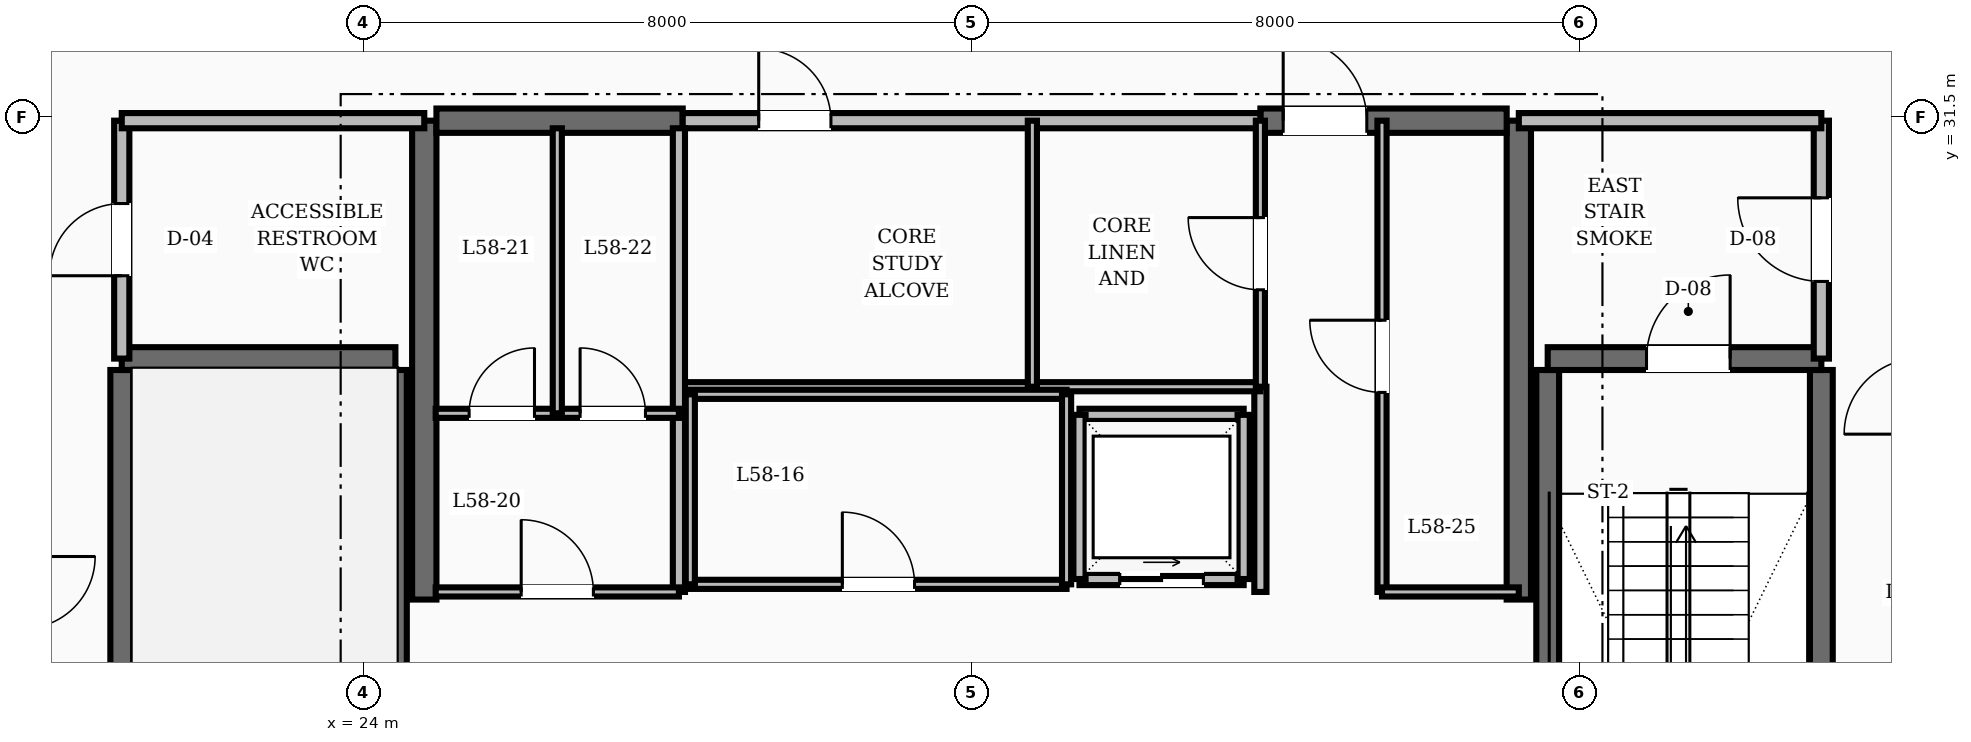
"""IFC4 building model, lengths in metres.
Left out: names, types, materials, properties, quantities, classifications, styles, units other than length and angle.
Written with IfcOpenShell. Run it as: python <this file> out.ifc"""

import sys

from ifc_helpers import new_model, si_unit, direction, frame, frame_2d, origin, place, context, subcontext, project, spatial, rectangle, extrude, element, fill, save


model = new_model("IFC4")
c1 = context("Model", 3, precision=1e-05, world=origin(), true_north=direction((0.0, 1.0)))
c2 = subcontext(c1, "Body", "Model", "MODEL_VIEW")
j1 = project(units=[si_unit("LENGTHUNIT", "METRE"), si_unit("PLANEANGLEUNIT", "RADIAN")], contexts=[c1])
p1 = place(None, origin())
s1 = spatial("IfcSite", under=j1, at=p1, CompositionType="ELEMENT")
p2 = place(p1, origin())
s2 = spatial("IfcBuilding", under=s1, at=p2, CompositionType="ELEMENT")
p3 = place(p2, frame((0.0, 0.0, 225.6)))
s3 = spatial("IfcBuildingStorey", under=s2, at=p3, CompositionType="ELEMENT", Elevation=225.6)
for number, where, z_axis, x_axis in (
    (1, (24.8, 25.15, 0.0), (0.0, 0.0, 1.0), (0.0, 1.0, 0.0)),
    (2, (39.2, 25.15, 0.0), (0.0, 0.0, 1.0), (0.0, 1.0, 0.0)),
):
    element("IfcWall", number, at=place(p3, frame(where, z_axis=z_axis, x_axis=x_axis)), inside=s3, PredefinedType="SHEAR", context=c2, shape_type="SweptSolid", body=[
        extrude(rectangle(XDim=6.3, YDim=0.32, at=frame_2d((3.15, 0.0))), origin(), (0.0, 0.0, 1.0), 3.6),
    ])
p4 = place(p3, frame((24.96, 31.45, 0.0), z_axis=(0.0, 0.0, 1.0), x_axis=(1.0, 0.0, 0.0)))
e3 = element("IfcWall", 3, at=p4, inside=s3, PredefinedType="SHEAR", context=c2, shape_type="SweptSolid", body=[
    extrude(rectangle(XDim=3.24, YDim=0.32, at=frame_2d((1.62, 0.0))), origin(), (0.0, 0.0, 1.0), 3.6),
])
p5 = place(p3, frame((35.8, 31.45, 0.0), z_axis=(0.0, 0.0, 1.0), x_axis=(1.0, 0.0, 0.0)))
e4 = element("IfcWall", 4, at=p5, inside=s3, PredefinedType="SHEAR", context=c2, shape_type="SweptSolid", body=[
    extrude(rectangle(XDim=3.24, YDim=0.32, at=frame_2d((1.62, 0.0))), origin(), (0.0, 0.0, 1.0), 3.6),
])
p6 = place(p5, frame((0.3, 0.0, 0.0)))
e5 = element("IfcOpeningElement", 5, at=p6, cuts=e4, PredefinedType="OPENING", context=c2, shape_type="SweptSolid", body=[
    extrude(rectangle(XDim=1.1, YDim=2.1, at=frame_2d((0.55, 1.05))), frame((0.0, 0.17, 0.0), z_axis=(0.0, -1.0, 0.0), x_axis=(1.0, 0.0, 0.0)), (0.0, 0.0, 1.0), 0.34),
])
for number, where, z_axis, x_axis in (
    (6, (20.82, 19.43, 0.0), (0.0, 0.0, 1.0), (0.0, 1.0, 0.0)),
    (7, (24.42, 19.43, 0.0), (0.0, 0.0, 1.0), (0.0, 1.0, 0.0)),
):
    element("IfcWall", number, at=place(p3, frame(where, z_axis=z_axis, x_axis=x_axis)), inside=s3, PredefinedType="SHEAR", context=c2, shape_type="SweptSolid", body=[
        extrude(rectangle(XDim=8.74, YDim=0.3, at=frame_2d((4.37, 0.0))), origin(), (0.0, 0.0, 1.0), 3.6),
    ])
p7 = place(p3, frame((20.82, 28.32, 0.0), z_axis=(0.0, 0.0, 1.0), x_axis=(1.0, 0.0, 0.0)))
e8 = element("IfcWall", 8, at=p7, inside=s3, PredefinedType="SHEAR", context=c2, shape_type="SweptSolid", body=[
    extrude(rectangle(XDim=3.6, YDim=0.3, at=frame_2d((1.8, 0.0))), origin(), (0.0, 0.0, 1.0), 3.6),
])
for number, where, z_axis, x_axis in (
    (9, (43.18, 19.43, 0.0), (0.0, 0.0, 1.0), (0.0, 1.0, 0.0)),
    (10, (39.58, 19.43, 0.0), (0.0, 0.0, 1.0), (0.0, 1.0, 0.0)),
):
    element("IfcWall", number, at=place(p3, frame(where, z_axis=z_axis, x_axis=x_axis)), inside=s3, PredefinedType="SHEAR", context=c2, shape_type="SweptSolid", body=[
        extrude(rectangle(XDim=8.74, YDim=0.3, at=frame_2d((4.37, 0.0))), origin(), (0.0, 0.0, 1.0), 3.6),
    ])
p8 = place(p3, frame((39.58, 28.32, 0.0), z_axis=(0.0, 0.0, 1.0), x_axis=(1.0, 0.0, 0.0)))
e11 = element("IfcWall", 11, at=p8, inside=s3, PredefinedType="SHEAR", context=c2, shape_type="SweptSolid", body=[
    extrude(rectangle(XDim=3.6, YDim=0.3, at=frame_2d((1.8, 0.0))), origin(), (0.0, 0.0, 1.0), 3.6),
])
p9 = place(p8, frame((1.3, 0.0, 0.0)))
e12 = element("IfcOpeningElement", 12, at=p9, cuts=e11, PredefinedType="OPENING", context=c2, shape_type="SweptSolid", body=[
    extrude(rectangle(XDim=1.1, YDim=2.1, at=frame_2d((0.55, 1.05))), frame((0.0, 0.16, 0.0), z_axis=(0.0, -1.0, 0.0), x_axis=(1.0, 0.0, 0.0)), (0.0, 0.0, 1.0), 0.32),
])
p10 = place(p3, frame((43.18, 28.32, 0.0), z_axis=(0.0, 0.0, 1.0), x_axis=(0.0, 1.0, 0.0)))
e13 = element("IfcWall", 13, at=p10, inside=s3, PredefinedType="SOLIDWALL", context=c2, shape_type="SweptSolid", body=[
    extrude(rectangle(XDim=3.13, YDim=0.2, at=frame_2d((1.565, 0.0))), origin(), (0.0, 0.0, 1.0), 2.87),
])
p11 = place(p10, frame((1.015, 0.0, 0.0)))
e14 = element("IfcOpeningElement", 14, at=p11, cuts=e13, PredefinedType="OPENING", context=c2, shape_type="SweptSolid", body=[
    extrude(rectangle(XDim=1.1, YDim=2.1, at=frame_2d((0.55, 1.05))), frame((0.0, 0.11, 0.0), z_axis=(0.0, -1.0, 0.0), x_axis=(1.0, 0.0, 0.0)), (0.0, 0.0, 1.0), 0.22),
])
p12 = place(p3, frame((39.2, 31.45, 0.0), z_axis=(0.0, 0.0, 1.0), x_axis=(1.0, 0.0, 0.0)))
e15 = element("IfcWall", 15, at=p12, inside=s3, PredefinedType="SOLIDWALL", context=c2, shape_type="SweptSolid", body=[
    extrude(rectangle(XDim=3.98, YDim=0.2, at=frame_2d((1.99, 0.0))), origin(), (0.0, 0.0, 1.0), 2.87),
])
p13 = place(p3, frame((20.82, 28.32, 0.0), z_axis=(0.0, 0.0, 1.0), x_axis=(0.0, 1.0, 0.0)))
e16 = element("IfcWall", 16, at=p13, inside=s3, PredefinedType="SOLIDWALL", context=c2, shape_type="SweptSolid", body=[
    extrude(rectangle(XDim=3.13, YDim=0.2, at=frame_2d((1.565, 0.0))), origin(), (0.0, 0.0, 1.0), 2.87),
])
p14 = place(p13, frame((1.09, 0.0, 0.0)))
e17 = element("IfcOpeningElement", 17, at=p14, cuts=e16, PredefinedType="OPENING", context=c2, shape_type="SweptSolid", body=[
    extrude(rectangle(XDim=0.95, YDim=2.1, at=frame_2d((0.475, 1.05))), frame((0.0, 0.11, 0.0), z_axis=(0.0, -1.0, 0.0), x_axis=(1.0, 0.0, 0.0)), (0.0, 0.0, 1.0), 0.22),
])
p15 = place(p3, frame((20.82, 31.45, 0.0), z_axis=(0.0, 0.0, 1.0), x_axis=(1.0, 0.0, 0.0)))
e18 = element("IfcWall", 18, at=p15, inside=s3, PredefinedType="SOLIDWALL", context=c2, shape_type="SweptSolid", body=[
    extrude(rectangle(XDim=3.98, YDim=0.2, at=frame_2d((1.99, 0.0))), origin(), (0.0, 0.0, 1.0), 2.87),
])
p16 = place(p3, frame((35.8, 25.25, 0.0), z_axis=(0.0, 0.0, 1.0), x_axis=(0.0, 1.0, 0.0)))
e19 = element("IfcWall", 19, at=p16, inside=s3, PredefinedType="SOLIDWALL", context=c2, shape_type="SweptSolid", body=[
    extrude(rectangle(XDim=2.7, YDim=0.16, at=frame_2d((1.35, 0.0))), origin(), (0.0, 0.0, 1.0), 2.87),
])
p17 = place(p3, frame((33.42, 25.42, 0.0), z_axis=(0.0, 0.0, 1.0), x_axis=(1.0, 0.0, 0.0)))
e20 = element("IfcWall", 20, at=p17, inside=s3, PredefinedType="SOLIDWALL", context=c2, shape_type="SweptSolid", body=[
    extrude(rectangle(XDim=2.16, YDim=0.16, at=frame_2d((1.08, 0.0))), origin(), (0.0, 0.0, 1.0), 2.87),
])
p18 = place(p17, frame((0.53, 0.0, 0.0)))
e21 = element("IfcOpeningElement", 21, at=p18, cuts=e20, PredefinedType="OPENING", context=c2, shape_type="SweptSolid", body=[
    extrude(rectangle(XDim=1.1, YDim=2.15, at=frame_2d((0.55, 1.075))), frame((0.0, 0.09, 0.0), z_axis=(0.0, -1.0, 0.0), x_axis=(1.0, 0.0, 0.0)), (0.0, 0.0, 1.0), 0.18),
])
for number, where, z_axis, x_axis in (
    (22, (33.42, 27.58, 0.0), (0.0, 0.0, 1.0), (1.0, 0.0, 0.0)),
    (23, (33.42, 25.42, 0.0), (0.0, 0.0, 1.0), (0.0, 1.0, 0.0)),
    (24, (35.58, 25.42, 0.0), (0.0, 0.0, 1.0), (0.0, 1.0, 0.0)),
):
    element("IfcWall", number, at=place(p3, frame(where, z_axis=z_axis, x_axis=x_axis)), inside=s3, PredefinedType="SOLIDWALL", context=c2, shape_type="SweptSolid", body=[
        extrude(rectangle(XDim=2.16, YDim=0.16, at=frame_2d((1.08, 0.0))), origin(), (0.0, 0.0, 1.0), 2.87),
    ])
p19 = place(p3, frame((28.2, 31.45, 0.0), z_axis=(0.0, 0.0, 1.0), x_axis=(1.0, 0.0, 0.0)))
e25 = element("IfcWall", 25, at=p19, inside=s3, PredefinedType="SOLIDWALL", context=c2, shape_type="SweptSolid", body=[
    extrude(rectangle(XDim=7.6, YDim=0.2, at=frame_2d((3.8, 0.0))), origin(), (0.0, 0.0, 1.0), 2.87),
])
p20 = place(p19, frame((1.0, 0.0, 0.0)))
e26 = element("IfcOpeningElement", 26, at=p20, cuts=e25, PredefinedType="OPENING", context=c2, shape_type="SweptSolid", body=[
    extrude(rectangle(XDim=0.95, YDim=2.1, at=frame_2d((0.475, 1.05))), frame((0.0, 0.11, 0.0), z_axis=(0.0, -1.0, 0.0), x_axis=(1.0, 0.0, 0.0)), (0.0, 0.0, 1.0), 0.22),
])
p21 = place(p3, frame((28.2, 27.95, 0.0), z_axis=(0.0, 0.0, 1.0), x_axis=(1.0, 0.0, 0.0)))
e27 = element("IfcWall", 27, at=p21, inside=s3, PredefinedType="PARTITIONING", context=c2, shape_type="SweptSolid", body=[
    extrude(rectangle(XDim=7.6, YDim=0.12, at=frame_2d((3.8, 0.0))), origin(), (0.0, 0.0, 1.0), 2.87),
])
p22 = place(p3, frame((35.8, 27.95, 0.0), z_axis=(0.0, 0.0, 1.0), x_axis=(0.0, 1.0, 0.0)))
e28 = element("IfcWall", 28, at=p22, inside=s3, PredefinedType="PARTITIONING", context=c2, shape_type="SweptSolid", body=[
    extrude(rectangle(XDim=3.5, YDim=0.12, at=frame_2d((1.75, 0.0))), origin(), (0.0, 0.0, 1.0), 2.87),
])
p23 = place(p22, frame((1.275, 0.0, 0.0)))
e29 = element("IfcOpeningElement", 29, at=p23, cuts=e28, PredefinedType="OPENING", context=c2, shape_type="SweptSolid", body=[
    extrude(rectangle(XDim=0.95, YDim=2.1, at=frame_2d((0.475, 1.05))), frame((0.0, 0.07, 0.0), z_axis=(0.0, -1.0, 0.0), x_axis=(1.0, 0.0, 0.0)), (0.0, 0.0, 1.0), 0.14),
])
p24 = place(p3, frame((32.8, 27.95, 0.0), z_axis=(0.0, 0.0, 1.0), x_axis=(0.0, 1.0, 0.0)))
e30 = element("IfcWall", 30, at=p24, inside=s3, PredefinedType="PARTITIONING", context=c2, shape_type="SweptSolid", body=[
    extrude(rectangle(XDim=3.5, YDim=0.12, at=frame_2d((1.75, 0.0))), origin(), (0.0, 0.0, 1.0), 2.87),
])
p25 = place(p3, frame((28.3, 25.35, 0.0), z_axis=(0.0, 0.0, 1.0), x_axis=(1.0, 0.0, 0.0)))
e31 = element("IfcWall", 31, at=p25, inside=s3, PredefinedType="PARTITIONING", context=c2, shape_type="SweptSolid", body=[
    extrude(rectangle(XDim=4.95, YDim=0.12, at=frame_2d((2.475, 0.0))), origin(), (0.0, 0.0, 1.0), 2.87),
])
p26 = place(p25, frame((2.0, 0.0, 0.0)))
e32 = element("IfcOpeningElement", 32, at=p26, cuts=e31, PredefinedType="OPENING", context=c2, shape_type="SweptSolid", body=[
    extrude(rectangle(XDim=0.95, YDim=2.1, at=frame_2d((0.475, 1.05))), frame((0.0, 0.07, 0.0), z_axis=(0.0, -1.0, 0.0), x_axis=(1.0, 0.0, 0.0)), (0.0, 0.0, 1.0), 0.14),
])
p27 = place(p3, frame((28.3, 27.85, 0.0), z_axis=(0.0, 0.0, 1.0), x_axis=(1.0, 0.0, 0.0)))
e33 = element("IfcWall", 33, at=p27, inside=s3, PredefinedType="PARTITIONING", context=c2, shape_type="SweptSolid", body=[
    extrude(rectangle(XDim=4.95, YDim=0.12, at=frame_2d((2.475, 0.0))), origin(), (0.0, 0.0, 1.0), 2.87),
])
for number, where, z_axis, x_axis in (
    (34, (28.3, 25.35, 0.0), (0.0, 0.0, 1.0), (0.0, 1.0, 0.0)),
    (35, (33.25, 25.35, 0.0), (0.0, 0.0, 1.0), (0.0, 1.0, 0.0)),
):
    element("IfcWall", number, at=place(p3, frame(where, z_axis=z_axis, x_axis=x_axis)), inside=s3, PredefinedType="PARTITIONING", context=c2, shape_type="SweptSolid", body=[
        extrude(rectangle(XDim=2.5, YDim=0.12, at=frame_2d((1.25, 0.0))), origin(), (0.0, 0.0, 1.0), 2.87),
    ])
p28 = place(p3, frame((28.15, 25.25, 0.0), z_axis=(0.0, 0.0, 1.0), x_axis=(0.0, 1.0, 0.0)))
e36 = element("IfcWall", 36, at=p28, inside=s3, PredefinedType="SOLIDWALL", context=c2, shape_type="SweptSolid", body=[
    extrude(rectangle(XDim=6.1, YDim=0.16, at=frame_2d((3.05, 0.0))), origin(), (0.0, 0.0, 1.0), 2.87),
])
p29 = place(p3, frame((24.95, 25.25, 0.0), z_axis=(0.0, 0.0, 1.0), x_axis=(1.0, 0.0, 0.0)))
e37 = element("IfcWall", 37, at=p29, inside=s3, PredefinedType="PARTITIONING", context=c2, shape_type="SweptSolid", body=[
    extrude(rectangle(XDim=3.2, YDim=0.12, at=frame_2d((1.6, 0.0))), origin(), (0.0, 0.0, 1.0), 2.87),
])
p30 = place(p29, frame((1.125, 0.0, 0.0)))
e38 = element("IfcOpeningElement", 38, at=p30, cuts=e37, PredefinedType="OPENING", context=c2, shape_type="SweptSolid", body=[
    extrude(rectangle(XDim=0.95, YDim=2.1, at=frame_2d((0.475, 1.05))), frame((0.0, 0.07, 0.0), z_axis=(0.0, -1.0, 0.0), x_axis=(1.0, 0.0, 0.0)), (0.0, 0.0, 1.0), 0.14),
])
p31 = place(p3, frame((37.4, 25.25, 0.0), z_axis=(0.0, 0.0, 1.0), x_axis=(0.0, 1.0, 0.0)))
e39 = element("IfcWall", 39, at=p31, inside=s3, PredefinedType="PARTITIONING", context=c2, shape_type="SweptSolid", body=[
    extrude(rectangle(XDim=6.2, YDim=0.12, at=frame_2d((3.1, 0.0))), origin(), (0.0, 0.0, 1.0), 2.87),
])
p32 = place(p31, frame((2.625, 0.0, 0.0)))
e40 = element("IfcOpeningElement", 40, at=p32, cuts=e39, PredefinedType="OPENING", context=c2, shape_type="SweptSolid", body=[
    extrude(rectangle(XDim=0.95, YDim=2.1, at=frame_2d((0.475, 1.05))), frame((0.0, 0.07, 0.0), z_axis=(0.0, -1.0, 0.0), x_axis=(1.0, 0.0, 0.0)), (0.0, 0.0, 1.0), 0.14),
])
p33 = place(p3, frame((37.4, 25.25, 0.0), z_axis=(0.0, 0.0, 1.0), x_axis=(1.0, 0.0, 0.0)))
e41 = element("IfcWall", 41, at=p33, inside=s3, PredefinedType="PARTITIONING", context=c2, shape_type="SweptSolid", body=[
    extrude(rectangle(XDim=1.8, YDim=0.12, at=frame_2d((0.9, 0.0))), origin(), (0.0, 0.0, 1.0), 2.87),
])
p34 = place(p3, frame((24.95, 27.6, 0.0), z_axis=(0.0, 0.0, 1.0), x_axis=(1.0, 0.0, 0.0)))
e42 = element("IfcWall", 42, at=p34, inside=s3, PredefinedType="PARTITIONING", context=c2, shape_type="SweptSolid", body=[
    extrude(rectangle(XDim=3.2, YDim=0.12, at=frame_2d((1.6, 0.0))), origin(), (0.0, 0.0, 1.0), 2.87),
])
p35 = place(p34, frame((0.44, 0.0, 0.0)))
e43 = element("IfcOpeningElement", 43, at=p35, cuts=e42, PredefinedType="OPENING", context=c2, shape_type="SweptSolid", body=[
    extrude(rectangle(XDim=0.86, YDim=2.1, at=frame_2d((0.43, 1.05))), frame((0.0, 0.07, 0.0), z_axis=(0.0, -1.0, 0.0), x_axis=(1.0, 0.0, 0.0)), (0.0, 0.0, 1.0), 0.14),
])
p36 = place(p34, frame((1.9, 0.0, 0.0)))
e44 = element("IfcOpeningElement", 44, at=p36, cuts=e42, PredefinedType="OPENING", context=c2, shape_type="SweptSolid", body=[
    extrude(rectangle(XDim=0.86, YDim=2.1, at=frame_2d((0.43, 1.05))), frame((0.0, 0.07, 0.0), z_axis=(0.0, -1.0, 0.0), x_axis=(1.0, 0.0, 0.0)), (0.0, 0.0, 1.0), 0.14),
])
p37 = place(p3, frame((26.55, 27.6, 0.0), z_axis=(0.0, 0.0, 1.0), x_axis=(0.0, 1.0, 0.0)))
e45 = element("IfcWall", 45, at=p37, inside=s3, PredefinedType="PARTITIONING", context=c2, shape_type="SweptSolid", body=[
    extrude(rectangle(XDim=3.75, YDim=0.12, at=frame_2d((1.875, 0.0))), origin(), (0.0, 0.0, 1.0), 2.87),
])
p38 = place(p3, frame((44.427, 32.303, 0.0), z_axis=(0.0, 0.0, 1.0), x_axis=(-0.707106781187, 0.707106781187, 0.0)))
e46 = element("IfcWall", 46, at=p38, inside=s3, PredefinedType="SOLIDWALL", context=c2, shape_type="SweptSolid", body=[
    extrude(rectangle(XDim=2.916, YDim=0.16, at=frame_2d((1.458, 0.0))), origin(), (0.0, 0.0, 1.0), 2.87),
])
p39 = place(p3, frame((21.635, 34.365, 0.0), z_axis=(0.0, 0.0, 1.0), x_axis=(-0.707106781187, -0.707106781187, 0.0)))
e47 = element("IfcWall", 47, at=p39, inside=s3, PredefinedType="SOLIDWALL", context=c2, shape_type="SweptSolid", body=[
    extrude(rectangle(XDim=2.916, YDim=0.16, at=frame_2d((1.458, 0.0))), origin(), (0.0, 0.0, 1.0), 2.87),
])
p40 = place(p39, frame((0.983, 0.0, 0.0)))
e48 = element("IfcOpeningElement", 48, at=p40, cuts=e47, PredefinedType="OPENING", context=c2, shape_type="SweptSolid", body=[
    extrude(rectangle(XDim=0.95, YDim=2.1, at=frame_2d((0.475, 1.05))), frame((0.0, 0.09, 0.0), z_axis=(0.0, -1.0, 0.0), x_axis=(1.0, 0.0, 0.0)), (0.0, 0.0, 1.0), 0.18),
])
p41 = place(p9, origin())
e49 = element("IfcDoor", 49, at=p41, inside=s3, OperationType="SINGLE_SWING_RIGHT", PredefinedType="DOOR", context=c2, shape_type="SweptSolid", body=[
    extrude(rectangle(XDim=1.1, YDim=2.1, at=frame_2d((0.55, 1.05))), frame((0.0, 0.025, 0.0), z_axis=(0.0, -1.0, 0.0), x_axis=(1.0, 0.0, 0.0)), (0.0, 0.0, 1.0), 0.05),
])
fill(e12, e49)
p42 = place(p11, origin())
e50 = element("IfcDoor", 50, at=p42, inside=s3, OperationType="SINGLE_SWING_RIGHT", PredefinedType="DOOR", context=c2, shape_type="SweptSolid", body=[
    extrude(rectangle(XDim=1.1, YDim=2.1, at=frame_2d((0.55, 1.05))), frame((0.0, 0.025, 0.0), z_axis=(0.0, -1.0, 0.0), x_axis=(1.0, 0.0, 0.0)), (0.0, 0.0, 1.0), 0.05),
])
fill(e14, e50)
p43 = place(p14, origin())
e51 = element("IfcDoor", 51, at=p43, inside=s3, OperationType="SINGLE_SWING_LEFT", PredefinedType="DOOR", context=c2, shape_type="SweptSolid", body=[
    extrude(rectangle(XDim=0.95, YDim=2.1, at=frame_2d((0.475, 1.05))), frame((0.0, 0.025, 0.0), z_axis=(0.0, -1.0, 0.0), x_axis=(1.0, 0.0, 0.0)), (0.0, 0.0, 1.0), 0.05),
])
fill(e17, e51)
p44 = place(p6, origin())
e52 = element("IfcDoor", 52, at=p44, inside=s3, OperationType="SINGLE_SWING_LEFT", PredefinedType="DOOR", context=c2, shape_type="SweptSolid", body=[
    extrude(rectangle(XDim=1.1, YDim=2.1, at=frame_2d((0.55, 1.05))), frame((0.0, 0.025, 0.0), z_axis=(0.0, -1.0, 0.0), x_axis=(1.0, 0.0, 0.0)), (0.0, 0.0, 1.0), 0.05),
])
fill(e5, e52)
p45 = place(p18, origin())
e53 = element("IfcDoor", 53, at=p45, inside=s3, OperationType="SLIDING_TO_RIGHT", PredefinedType="DOOR", context=c2, shape_type="SweptSolid", body=[
    extrude(rectangle(XDim=1.1, YDim=2.15, at=frame_2d((0.55, 1.075))), frame((0.0, 0.025, 0.0), z_axis=(0.0, -1.0, 0.0), x_axis=(1.0, 0.0, 0.0)), (0.0, 0.0, 1.0), 0.05),
])
fill(e21, e53)
p46 = place(p20, origin())
e54 = element("IfcDoor", 54, at=p46, inside=s3, OperationType="SINGLE_SWING_LEFT", PredefinedType="DOOR", context=c2, shape_type="SweptSolid", body=[
    extrude(rectangle(XDim=0.95, YDim=2.1, at=frame_2d((0.475, 1.05))), frame((0.0, 0.025, 0.0), z_axis=(0.0, -1.0, 0.0), x_axis=(1.0, 0.0, 0.0)), (0.0, 0.0, 1.0), 0.05),
])
fill(e26, e54)
p47 = place(p23, origin())
e55 = element("IfcDoor", 55, at=p47, inside=s3, OperationType="SINGLE_SWING_RIGHT", PredefinedType="DOOR", context=c2, shape_type="SweptSolid", body=[
    extrude(rectangle(XDim=0.95, YDim=2.1, at=frame_2d((0.475, 1.05))), frame((0.0, 0.025, 0.0), z_axis=(0.0, -1.0, 0.0), x_axis=(1.0, 0.0, 0.0)), (0.0, 0.0, 1.0), 0.05),
])
fill(e29, e55)
p48 = place(p26, origin())
e56 = element("IfcDoor", 56, at=p48, inside=s3, OperationType="SINGLE_SWING_LEFT", PredefinedType="DOOR", context=c2, shape_type="SweptSolid", body=[
    extrude(rectangle(XDim=0.95, YDim=2.1, at=frame_2d((0.475, 1.05))), frame((0.0, 0.025, 0.0), z_axis=(0.0, -1.0, 0.0), x_axis=(1.0, 0.0, 0.0)), (0.0, 0.0, 1.0), 0.05),
])
fill(e32, e56)
p49 = place(p30, origin())
e57 = element("IfcDoor", 57, at=p49, inside=s3, OperationType="SINGLE_SWING_LEFT", PredefinedType="DOOR", context=c2, shape_type="SweptSolid", body=[
    extrude(rectangle(XDim=0.95, YDim=2.1, at=frame_2d((0.475, 1.05))), frame((0.0, 0.025, 0.0), z_axis=(0.0, -1.0, 0.0), x_axis=(1.0, 0.0, 0.0)), (0.0, 0.0, 1.0), 0.05),
])
fill(e38, e57)
p50 = place(p35, origin())
e58 = element("IfcDoor", 58, at=p50, inside=s3, OperationType="SINGLE_SWING_RIGHT", PredefinedType="DOOR", context=c2, shape_type="SweptSolid", body=[
    extrude(rectangle(XDim=0.86, YDim=2.1, at=frame_2d((0.43, 1.05))), frame((0.0, 0.025, 0.0), z_axis=(0.0, -1.0, 0.0), x_axis=(1.0, 0.0, 0.0)), (0.0, 0.0, 1.0), 0.05),
])
fill(e43, e58)
p51 = place(p36, origin())
e59 = element("IfcDoor", 59, at=p51, inside=s3, OperationType="SINGLE_SWING_LEFT", PredefinedType="DOOR", context=c2, shape_type="SweptSolid", body=[
    extrude(rectangle(XDim=0.86, YDim=2.1, at=frame_2d((0.43, 1.05))), frame((0.0, 0.025, 0.0), z_axis=(0.0, -1.0, 0.0), x_axis=(1.0, 0.0, 0.0)), (0.0, 0.0, 1.0), 0.05),
])
fill(e44, e59)
p52 = place(p32, origin())
e60 = element("IfcDoor", 60, at=p52, inside=s3, OperationType="SINGLE_SWING_RIGHT", PredefinedType="DOOR", context=c2, shape_type="SweptSolid", body=[
    extrude(rectangle(XDim=0.95, YDim=2.1, at=frame_2d((0.475, 1.05))), frame((0.0, 0.025, 0.0), z_axis=(0.0, -1.0, 0.0), x_axis=(1.0, 0.0, 0.0)), (0.0, 0.0, 1.0), 0.05),
])
fill(e40, e60)
save(model, sys.argv[1])
